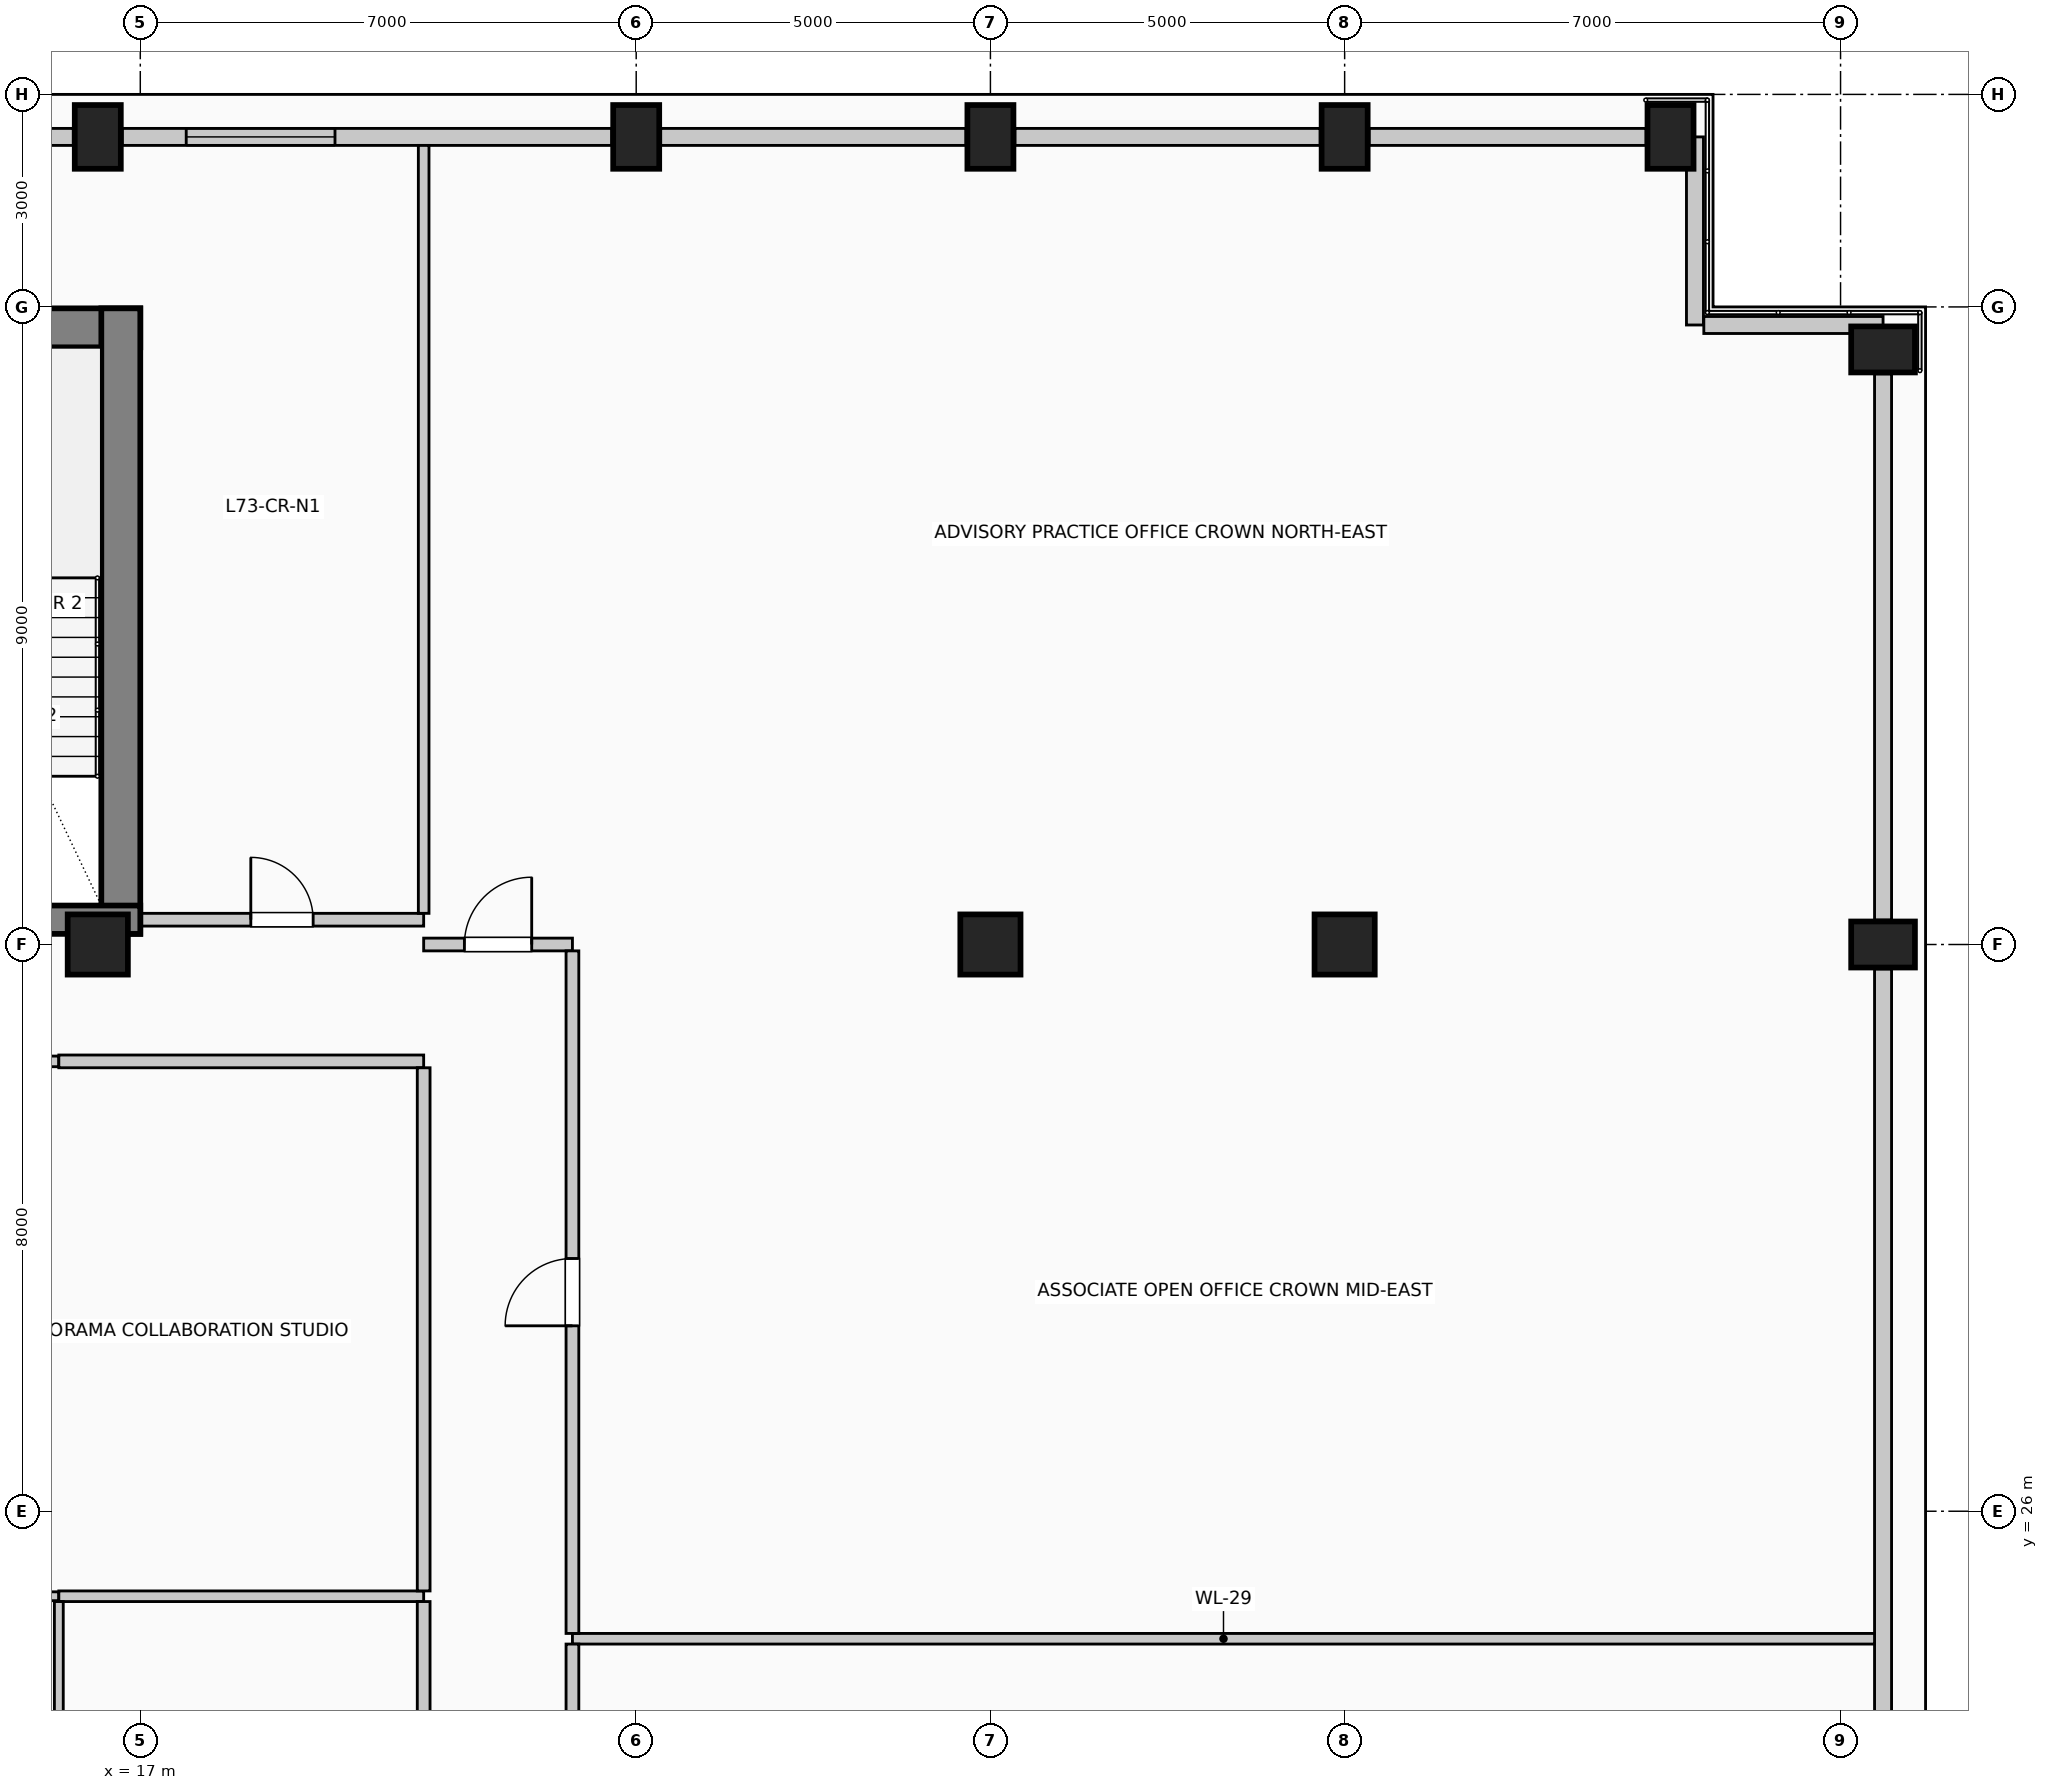
"""IFC4 building model, lengths in metres.
Left out: names, types, materials, properties, quantities, classifications, styles, units other than length and angle.
Written with IfcOpenShell. Run it as: python <this file> out.ifc"""

import sys

from ifc_helpers import new_model, si_unit, direction, frame, frame_2d, origin, origin_2d, place, context, subcontext, project, spatial, rectangle, circle, extrude, element, fill, save


model = new_model("IFC4")
c1 = context("Model", 3, precision=1e-05, world=origin(), true_north=direction((0.0, 1.0)))
c2 = subcontext(c1, "Body", "Model", "MODEL_VIEW")
j1 = project(units=[si_unit("LENGTHUNIT", "METRE"), si_unit("PLANEANGLEUNIT", "RADIAN")], contexts=[c1])
p1 = place(None, origin())
s1 = spatial("IfcSite", under=j1, at=p1, CompositionType="ELEMENT")
p2 = place(p1, origin())
s2 = spatial("IfcBuilding", under=s1, at=p2, CompositionType="ELEMENT")
p3 = place(p2, frame((0.0, 0.0, 301.0)))
s3 = spatial("IfcBuildingStorey", under=s2, at=p3, CompositionType="ELEMENT", Elevation=301.0)
p4 = place(p3, frame((3.0, 42.705, 0.0), z_axis=(0.0, 0.0, 1.0), x_axis=(1.0, 0.0, 0.0)))
e1 = element("IfcWall", 1, at=p4, inside=s3, PredefinedType="SHEAR", context=c2, shape_type="SweptSolid", body=[
    extrude(rectangle(XDim=14.0, YDim=0.55, at=frame_2d((7.0, 0.0))), origin(), (0.0, 0.0, 1.0), 4.0),
])
p5 = place(p3, frame((16.725, 34.15, 0.0), z_axis=(0.0, 0.0, 1.0), x_axis=(0.0, 1.0, 0.0)))
e2 = element("IfcWall", 2, at=p5, inside=s3, PredefinedType="SHEAR", context=c2, shape_type="SweptSolid", body=[
    extrude(rectangle(XDim=8.83, YDim=0.55, at=frame_2d((4.415, 0.0))), origin(), (0.0, 0.0, 1.0), 4.0),
])
p6 = place(p3, frame((12.29, 34.35, 0.0), z_axis=(0.0, 0.0, 1.0), x_axis=(1.0, 0.0, 0.0)))
e3 = element("IfcWall", 3, at=p6, inside=s3, PredefinedType="SHEAR", context=c2, shape_type="SweptSolid", body=[
    extrude(rectangle(XDim=4.71, YDim=0.4, at=frame_2d((2.355, 0.0))), origin(), (0.0, 0.0, 1.0), 4.0),
])
p7 = place(p6, frame((1.4, 0.0, 0.0)))
e4 = element("IfcOpeningElement", 4, at=p7, cuts=e3, PredefinedType="OPENING", context=c2, shape_type="SweptSolid", body=[
    extrude(rectangle(XDim=1.15, YDim=2.2, at=frame_2d((0.575, 1.1))), frame((0.0, 0.21, 0.0), z_axis=(0.0, -1.0, 0.0), x_axis=(1.0, 0.0, 0.0)), (0.0, 0.0, 1.0), 0.42),
])
for number, where, z_axis, x_axis in (
    (5, (16.4, 45.4, 0.0), (0.0, 0.0, 1.0), (1.0, 0.0, 0.0)),
    (6, (24.0, 45.4, 0.0), (0.0, 0.0, 1.0), (1.0, 0.0, 0.0)),
    (7, (29.0, 45.4, 0.0), (0.0, 0.0, 1.0), (1.0, 0.0, 0.0)),
    (8, (34.0, 45.4, 0.0), (0.0, 0.0, 1.0), (1.0, 0.0, 0.0)),
    (9, (38.6, 45.4, 0.0), (0.0, 0.0, 1.0), (1.0, 0.0, 0.0)),
    (10, (41.6, 34.0, 0.0), (0.0, 0.0, 1.0), (0.0, 1.0, 0.0)),
    (11, (41.6, 42.4, 0.0), (0.0, 0.0, 1.0), (0.0, 1.0, 0.0)),
):
    element("IfcColumn", number, at=place(p3, frame(where, z_axis=z_axis, x_axis=x_axis)), inside=s3, PredefinedType="COLUMN", context=c2, shape_type="SweptSolid", body=[
        extrude(rectangle(XDim=0.65, YDim=0.9, at=origin_2d()), origin(), (0.0, 0.0, 1.0), 4.0),
    ])
for number, where, z_axis, x_axis in (
    (12, (16.4, 34.0, 0.0), (0.0, 0.0, 1.0), (1.0, 0.0, 0.0)),
    (13, (29.0, 34.0, 0.0), (0.0, 0.0, 1.0), (1.0, 0.0, 0.0)),
    (14, (34.0, 34.0, 0.0), (0.0, 0.0, 1.0), (1.0, 0.0, 0.0)),
):
    element("IfcColumn", number, at=place(p3, frame(where, z_axis=z_axis, x_axis=x_axis)), inside=s3, PredefinedType="COLUMN", context=c2, shape_type="SweptSolid", body=[
        extrude(circle(Radius=0.425, at=origin_2d()), origin(), (0.0, 0.0, 1.0), 4.0),
    ])
p8 = place(p3, frame((14.345, 45.4, 0.0), z_axis=(0.0, 0.0, 1.0), x_axis=(1.0, 0.0, 0.0)))
e15 = element("IfcWall", 15, at=p8, inside=s3, PredefinedType="SOLIDWALL", context=c2, shape_type="SweptSolid", body=[
    extrude(rectangle(XDim=1.71, YDim=0.24, at=frame_2d((0.855, 0.0))), origin(), (0.0, 0.0, 1.0), 3.025),
])
p9 = place(p3, frame((16.745, 45.4, 0.0), z_axis=(0.0, 0.0, 1.0), x_axis=(1.0, 0.0, 0.0)))
e16 = element("IfcWall", 16, at=p9, inside=s3, PredefinedType="SOLIDWALL", context=c2, shape_type="SweptSolid", body=[
    extrude(rectangle(XDim=6.91, YDim=0.24, at=frame_2d((3.455, 0.0))), origin(), (0.0, 0.0, 1.0), 3.025),
])
p10 = place(p9, frame((0.903, 0.0, 0.35)))
e17 = element("IfcOpeningElement", 17, at=p10, cuts=e16, PredefinedType="OPENING", context=c2, shape_type="SweptSolid", body=[
    extrude(rectangle(XDim=2.1, YDim=2.2, at=frame_2d((1.05, 1.1))), frame((0.0, 0.13, 0.0), z_axis=(0.0, -1.0, 0.0), x_axis=(1.0, 0.0, 0.0)), (0.0, 0.0, 1.0), 0.26),
])
p11 = place(p3, frame((24.345, 45.4, 0.0), z_axis=(0.0, 0.0, 1.0), x_axis=(1.0, 0.0, 0.0)))
e18 = element("IfcWall", 18, at=p11, inside=s3, PredefinedType="SOLIDWALL", context=c2, shape_type="SweptSolid", body=[
    extrude(rectangle(XDim=4.31, YDim=0.24, at=frame_2d((2.155, 0.0))), origin(), (0.0, 0.0, 1.0), 2.175),
])
p12 = place(p3, frame((29.345, 45.4, 0.0), z_axis=(0.0, 0.0, 1.0), x_axis=(1.0, 0.0, 0.0)))
e19 = element("IfcWall", 19, at=p12, inside=s3, PredefinedType="SOLIDWALL", context=c2, shape_type="SweptSolid", body=[
    extrude(rectangle(XDim=4.31, YDim=0.24, at=frame_2d((2.155, 0.0))), origin(), (0.0, 0.0, 1.0), 2.165),
])
p13 = place(p3, frame((34.345, 45.4, 0.0), z_axis=(0.0, 0.0, 1.0), x_axis=(1.0, 0.0, 0.0)))
e20 = element("IfcWall", 20, at=p13, inside=s3, PredefinedType="SOLIDWALL", context=c2, shape_type="SweptSolid", body=[
    extrude(rectangle(XDim=3.91, YDim=0.24, at=frame_2d((1.955, 0.0))), origin(), (0.0, 0.0, 1.0), 2.165),
])
p14 = place(p3, frame((41.6, 33.655, 0.0), z_axis=(0.0, 0.0, 1.0), x_axis=(0.0, -1.0, 0.0)))
e21 = element("IfcWall", 21, at=p14, inside=s3, PredefinedType="SOLIDWALL", context=c2, shape_type="SweptSolid", body=[
    extrude(rectangle(XDim=15.31, YDim=0.24, at=frame_2d((7.655, 0.0))), origin(), (0.0, 0.0, 1.0), 3.015),
])
p15 = place(p3, frame((41.6, 42.055, 0.0), z_axis=(0.0, 0.0, 1.0), x_axis=(0.0, -1.0, 0.0)))
e22 = element("IfcWall", 22, at=p15, inside=s3, PredefinedType="SOLIDWALL", context=c2, shape_type="SweptSolid", body=[
    extrude(rectangle(XDim=7.71, YDim=0.24, at=frame_2d((3.855, 0.0))), origin(), (0.0, 0.0, 1.0), 3.015),
])
p16 = place(p3, frame((38.945, 45.4, 0.0), z_axis=(0.0, 0.0, 1.0), x_axis=(0.0, -1.0, 0.0)))
e23 = element("IfcWall", 23, at=p16, inside=s3, PredefinedType="SOLIDWALL", context=c2, shape_type="SweptSolid", body=[
    extrude(rectangle(XDim=2.655, YDim=0.24, at=frame_2d((1.327, 0.0))), origin(), (0.0, 0.0, 1.0), 2.165),
])
p17 = place(p3, frame((39.07, 42.745, 0.0), z_axis=(0.0, 0.0, 1.0), x_axis=(1.0, 0.0, 0.0)))
e24 = element("IfcWall", 24, at=p17, inside=s3, PredefinedType="SOLIDWALL", context=c2, shape_type="SweptSolid", body=[
    extrude(rectangle(XDim=2.53, YDim=0.24, at=frame_2d((1.265, 0.0))), origin(), (0.0, 0.0, 1.0), 2.165),
])
p18 = place(p3, frame((23.1, 24.2, 0.0), z_axis=(0.0, 0.0, 1.0), x_axis=(1.0, 0.0, 0.0)))
e25 = element("IfcWall", 25, at=p18, inside=s3, PredefinedType="PARTITIONING", context=c2, shape_type="SweptSolid", body=[
    extrude(rectangle(XDim=18.38, YDim=0.15, at=frame_2d((9.19, 0.0))), origin(), (0.0, 0.0, 1.0), 3.775),
])
p19 = place(p3, frame((12.2, 24.8, 0.0), z_axis=(0.0, 0.0, 1.0), x_axis=(1.0, 0.0, 0.0)))
e26 = element("IfcWall", 26, at=p19, inside=s3, PredefinedType="PARTITIONING", context=c2, shape_type="SweptSolid", body=[
    extrude(rectangle(XDim=3.65, YDim=0.125, at=frame_2d((1.825, 0.0))), origin(), (0.0, 0.0, 1.0), 3.775),
])
p20 = place(p3, frame((15.85, 24.8, 0.0), z_axis=(0.0, 0.0, 1.0), x_axis=(1.0, 0.0, 0.0)))
e27 = element("IfcWall", 27, at=p20, inside=s3, PredefinedType="PARTITIONING", context=c2, shape_type="SweptSolid", body=[
    extrude(rectangle(XDim=5.15, YDim=0.15, at=frame_2d((2.575, 0.0))), origin(), (0.0, 0.0, 1.0), 3.775),
])
p21 = place(p3, frame((12.33, 32.35, 0.0), z_axis=(0.0, 0.0, 1.0), x_axis=(1.0, 0.0, 0.0)))
e28 = element("IfcWall", 28, at=p21, inside=s3, PredefinedType="PARTITIONING", context=c2, shape_type="SweptSolid", body=[
    extrude(rectangle(XDim=3.52, YDim=0.15, at=frame_2d((1.76, 0.0))), origin(), (0.0, 0.0, 1.0), 3.775),
])
p22 = place(p21, frame((1.285, 0.0, 0.0)))
e29 = element("IfcOpeningElement", 29, at=p22, cuts=e28, PredefinedType="OPENING", context=c2, shape_type="SweptSolid", body=[
    extrude(rectangle(XDim=0.95, YDim=2.15, at=frame_2d((0.475, 1.075))), frame((0.0, 0.085, 0.0), z_axis=(0.0, -1.0, 0.0), x_axis=(1.0, 0.0, 0.0)), (0.0, 0.0, 1.0), 0.17),
])
p23 = place(p3, frame((15.85, 32.35, 0.0), z_axis=(0.0, 0.0, 1.0), x_axis=(1.0, 0.0, 0.0)))
e30 = element("IfcWall", 30, at=p23, inside=s3, PredefinedType="PARTITIONING", context=c2, shape_type="SweptSolid", body=[
    extrude(rectangle(XDim=5.15, YDim=0.18, at=frame_2d((2.575, 0.0))), origin(), (0.0, 0.0, 1.0), 3.775),
])
p24 = place(p3, frame((21.0, 34.0, 0.0), z_axis=(0.0, 0.0, 1.0), x_axis=(1.0, 0.0, 0.0)))
e31 = element("IfcWall", 31, at=p24, inside=s3, PredefinedType="PARTITIONING", context=c2, shape_type="SweptSolid", body=[
    extrude(rectangle(XDim=2.1, YDim=0.18, at=frame_2d((1.05, 0.0))), origin(), (0.0, 0.0, 1.0), 3.27),
])
p25 = place(p24, frame((0.575, 0.0, 0.0)))
e32 = element("IfcOpeningElement", 32, at=p25, cuts=e31, PredefinedType="OPENING", context=c2, shape_type="SweptSolid", body=[
    extrude(rectangle(XDim=0.95, YDim=2.15, at=frame_2d((0.475, 1.075))), frame((0.0, 0.1, 0.0), z_axis=(0.0, -1.0, 0.0), x_axis=(1.0, 0.0, 0.0)), (0.0, 0.0, 1.0), 0.2),
])
p26 = place(p3, frame((17.0, 34.35, 0.0), z_axis=(0.0, 0.0, 1.0), x_axis=(1.0, 0.0, 0.0)))
e33 = element("IfcWall", 33, at=p26, inside=s3, PredefinedType="PARTITIONING", context=c2, shape_type="SweptSolid", body=[
    extrude(rectangle(XDim=4.0, YDim=0.18, at=frame_2d((2.0, 0.0))), origin(), (0.0, 0.0, 1.0), 3.775),
])
p27 = place(p26, frame((1.56, 0.0, 0.0)))
e34 = element("IfcOpeningElement", 34, at=p27, cuts=e33, PredefinedType="OPENING", context=c2, shape_type="SweptSolid", body=[
    extrude(rectangle(XDim=0.88, YDim=2.1, at=frame_2d((0.44, 1.05))), frame((0.0, 0.1, 0.0), z_axis=(0.0, -1.0, 0.0), x_axis=(1.0, 0.0, 0.0)), (0.0, 0.0, 1.0), 0.2),
])
p28 = place(p3, frame((15.85, 17.39, 0.0), z_axis=(0.0, 0.0, 1.0), x_axis=(0.0, 1.0, 0.0)))
e35 = element("IfcWall", 35, at=p28, inside=s3, PredefinedType="PARTITIONING", context=c2, shape_type="SweptSolid", body=[
    extrude(rectangle(XDim=7.335, YDim=0.125, at=frame_2d((3.667, 0.0))), origin(), (0.0, 0.0, 1.0), 3.775),
])
p29 = place(p3, frame((21.0, 17.39, 0.0), z_axis=(0.0, 0.0, 1.0), x_axis=(0.0, 1.0, 0.0)))
e36 = element("IfcWall", 36, at=p29, inside=s3, PredefinedType="PARTITIONING", context=c2, shape_type="SweptSolid", body=[
    extrude(rectangle(XDim=7.335, YDim=0.18, at=frame_2d((3.667, 0.0))), origin(), (0.0, 0.0, 1.0), 3.775),
])
p30 = place(p3, frame((21.0, 24.875, 0.0), z_axis=(0.0, 0.0, 1.0), x_axis=(0.0, 1.0, 0.0)))
e37 = element("IfcWall", 37, at=p30, inside=s3, PredefinedType="PARTITIONING", context=c2, shape_type="SweptSolid", body=[
    extrude(rectangle(XDim=7.385, YDim=0.18, at=frame_2d((3.692, 0.0))), origin(), (0.0, 0.0, 1.0), 3.775),
])
p31 = place(p3, frame((21.0, 34.44, 0.0), z_axis=(0.0, 0.0, 1.0), x_axis=(0.0, 1.0, 0.0)))
e38 = element("IfcWall", 38, at=p31, inside=s3, PredefinedType="PARTITIONING", context=c2, shape_type="SweptSolid", body=[
    extrude(rectangle(XDim=10.84, YDim=0.15, at=frame_2d((5.42, 0.0))), origin(), (0.0, 0.0, 1.0), 3.775),
])
p32 = place(p3, frame((23.1, 17.3, 0.0), z_axis=(0.0, 0.0, 1.0), x_axis=(0.0, 1.0, 0.0)))
e39 = element("IfcWall", 39, at=p32, inside=s3, PredefinedType="PARTITIONING", context=c2, shape_type="SweptSolid", body=[
    extrude(rectangle(XDim=6.825, YDim=0.18, at=frame_2d((3.413, 0.0))), origin(), (0.0, 0.0, 1.0), 3.775),
])
p33 = place(p32, frame((2.887, 0.0, 0.0)))
e40 = element("IfcOpeningElement", 40, at=p33, cuts=e39, PredefinedType="OPENING", context=c2, shape_type="SweptSolid", body=[
    extrude(rectangle(XDim=1.05, YDim=2.15, at=frame_2d((0.525, 1.075))), frame((0.0, 0.1, 0.0), z_axis=(0.0, -1.0, 0.0), x_axis=(1.0, 0.0, 0.0)), (0.0, 0.0, 1.0), 0.2),
])
p34 = place(p3, frame((23.1, 24.275, 0.0), z_axis=(0.0, 0.0, 1.0), x_axis=(0.0, 1.0, 0.0)))
e41 = element("IfcWall", 41, at=p34, inside=s3, PredefinedType="PARTITIONING", context=c2, shape_type="SweptSolid", body=[
    extrude(rectangle(XDim=9.635, YDim=0.18, at=frame_2d((4.817, 0.0))), origin(), (0.0, 0.0, 1.0), 3.775),
])
p35 = place(p34, frame((4.343, 0.0, 0.0)))
e42 = element("IfcOpeningElement", 42, at=p35, cuts=e41, PredefinedType="OPENING", context=c2, shape_type="SweptSolid", body=[
    extrude(rectangle(XDim=0.95, YDim=2.15, at=frame_2d((0.475, 1.075))), frame((0.0, 0.1, 0.0), z_axis=(0.0, -1.0, 0.0), x_axis=(1.0, 0.0, 0.0)), (0.0, 0.0, 1.0), 0.2),
])
p36 = place(p10, origin())
e43 = element("IfcWindow", 43, at=p36, inside=s3, PartitioningType="SINGLE_PANEL", PredefinedType="WINDOW", context=c2, shape_type="SweptSolid", body=[
    extrude(rectangle(XDim=2.1, YDim=2.2, at=frame_2d((1.05, 1.1))), frame((0.0, 0.03, 0.0), z_axis=(0.0, -1.0, 0.0), x_axis=(1.0, 0.0, 0.0)), (0.0, 0.0, 1.0), 0.06),
])
fill(e17, e43)
p37 = place(p25, origin())
e44 = element("IfcDoor", 44, at=p37, inside=s3, OperationType="SINGLE_SWING_RIGHT", PredefinedType="DOOR", context=c2, shape_type="SweptSolid", body=[
    extrude(rectangle(XDim=0.95, YDim=2.15, at=frame_2d((0.475, 1.075))), frame((0.0, 0.025, 0.0), z_axis=(0.0, -1.0, 0.0), x_axis=(1.0, 0.0, 0.0)), (0.0, 0.0, 1.0), 0.05),
])
fill(e32, e44)
p38 = place(p27, origin())
e45 = element("IfcDoor", 45, at=p38, inside=s3, OperationType="SINGLE_SWING_LEFT", PredefinedType="DOOR", context=c2, shape_type="SweptSolid", body=[
    extrude(rectangle(XDim=0.88, YDim=2.1, at=frame_2d((0.44, 1.05))), frame((0.0, 0.025, 0.0), z_axis=(0.0, -1.0, 0.0), x_axis=(1.0, 0.0, 0.0)), (0.0, 0.0, 1.0), 0.05),
])
fill(e34, e45)
p39 = place(p35, origin())
e46 = element("IfcDoor", 46, at=p39, inside=s3, OperationType="SINGLE_SWING_LEFT", PredefinedType="DOOR", context=c2, shape_type="SweptSolid", body=[
    extrude(rectangle(XDim=0.95, YDim=2.15, at=frame_2d((0.475, 1.075))), frame((0.0, 0.025, 0.0), z_axis=(0.0, -1.0, 0.0), x_axis=(1.0, 0.0, 0.0)), (0.0, 0.0, 1.0), 0.05),
])
fill(e42, e46)
save(model, sys.argv[1])
